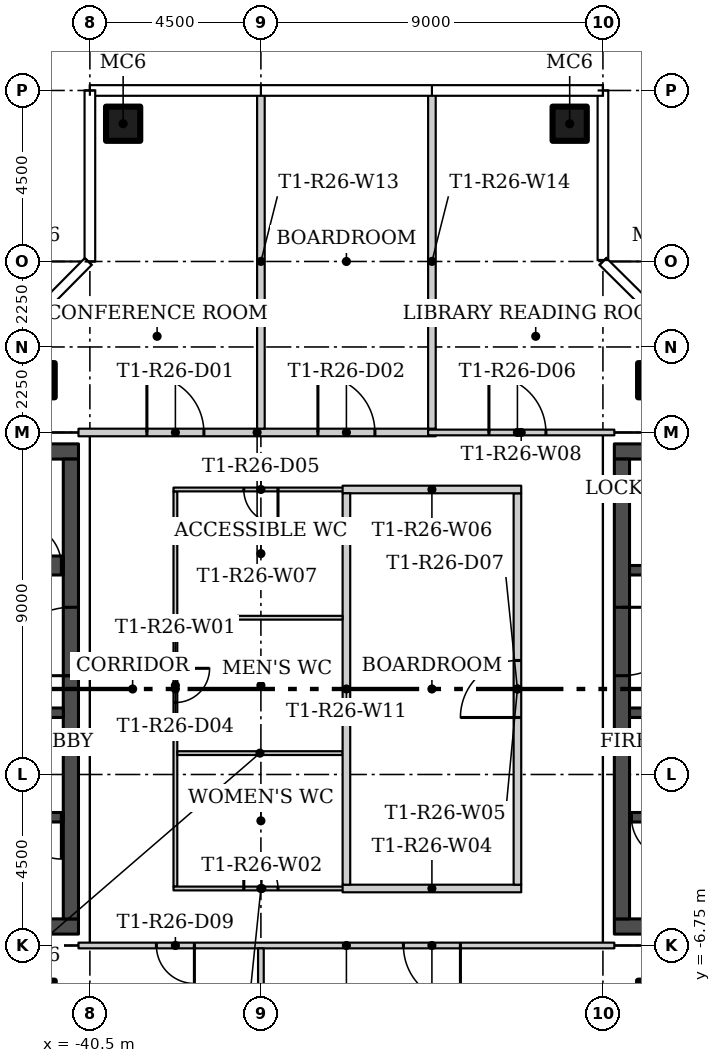
"""IFC4 building model, lengths in metres.
Left out: names, types, materials, properties, quantities, classifications, styles, units other than length and angle.
Written with IfcOpenShell. Run it as: python <this file> out.ifc"""

import sys

from ifc_helpers import new_model, si_unit, direction, frame, frame_2d, origin, origin_2d, place, context, subcontext, project, spatial, rectangle, hollow_rectangle, extrude, element, fill, save


model = new_model("IFC4")
c1 = context("Model", 3, precision=1e-05, world=origin(), true_north=direction((0.0, 1.0)))
c2 = subcontext(c1, "Body", "Model", "MODEL_VIEW")
j1 = project(units=[si_unit("LENGTHUNIT", "METRE"), si_unit("PLANEANGLEUNIT", "RADIAN")], contexts=[c1])
p1 = place(None, origin())
s1 = spatial("IfcSite", under=j1, at=p1, CompositionType="ELEMENT")
p2 = place(p1, origin())
s2 = spatial("IfcBuilding", under=s1, at=p2, CompositionType="ELEMENT")
p3 = place(p2, frame((0.0, 0.0, 242.1)))
s3 = spatial("IfcBuildingStorey", under=s2, at=p3, CompositionType="ELEMENT", Elevation=242.1)
for number, where in (
    (1, (-25.625, 8.125, 0.0)),
    (2, (-25.625, -8.125, 0.0)),
    (3, (-41.875, 8.125, 0.0)),
    (4, (-41.875, -8.125, 0.0)),
    (5, (-39.625, 14.875, 0.0)),
    (6, (-27.875, 14.875, 0.0)),
):
    element("IfcColumn", number, at=place(p3, frame(where)), inside=s3, PredefinedType="COLUMN", context=c2, shape_type="SweptSolid", body=[
        extrude(hollow_rectangle(XDim=0.9, YDim=0.9, WallThickness=0.036, at=origin_2d()), origin(), (0.0, 0.0, 1.0), 3.55),
    ])
p4 = place(p3, frame((-38.25, 5.2, 0.0), z_axis=(0.0, 0.0, 1.0), x_axis=(0.0, -1.0, 0.0)))
e7 = element("IfcWall", 7, at=p4, inside=s3, PredefinedType="PARTITIONING", context=c2, shape_type="SweptSolid", body=[
    extrude(rectangle(XDim=10.4, YDim=0.1, at=frame_2d((5.2, 0.0))), origin(), (0.0, 0.0, 1.0), 3.55),
])
p5 = place(p4, frame((4.656, 0.0, 0.0)))
e8 = element("IfcOpeningElement", 8, at=p5, cuts=e7, PredefinedType="OPENING", context=c2, shape_type="SweptSolid", body=[
    extrude(rectangle(XDim=0.9, YDim=2.1, at=frame_2d((0.45, 1.05))), frame((0.0, 0.06, 0.0), z_axis=(0.0, -1.0, 0.0), x_axis=(1.0, 0.0, 0.0)), (0.0, 0.0, 1.0), 0.12),
])
p6 = place(p3, frame((-38.3, -5.25, 0.0)))
e9 = element("IfcWall", 9, at=p6, inside=s3, PredefinedType="PARTITIONING", context=c2, shape_type="SweptSolid", body=[
    extrude(rectangle(XDim=4.65, YDim=0.1, at=frame_2d((2.325, 0.0))), origin(), (0.0, 0.0, 1.0), 3.55),
])
p7 = place(p6, frame((1.85, 0.0, 0.0)))
e10 = element("IfcOpeningElement", 10, at=p7, cuts=e9, PredefinedType="OPENING", context=c2, shape_type="SweptSolid", body=[
    extrude(rectangle(XDim=0.9, YDim=2.1, at=frame_2d((0.45, 1.05))), frame((0.0, 0.06, 0.0), z_axis=(0.0, -1.0, 0.0), x_axis=(1.0, 0.0, 0.0)), (0.0, 0.0, 1.0), 0.12),
])
p8 = place(p3, frame((-33.65, 5.25, 0.0), z_axis=(0.0, 0.0, 1.0), x_axis=(-1.0, 0.0, 0.0)))
e11 = element("IfcWall", 11, at=p8, inside=s3, PredefinedType="PARTITIONING", context=c2, shape_type="SweptSolid", body=[
    extrude(rectangle(XDim=4.65, YDim=0.1, at=frame_2d((2.325, 0.0))), origin(), (0.0, 0.0, 1.0), 3.55),
])
p9 = place(p8, frame((1.9, 0.0, 0.0)))
e12 = element("IfcOpeningElement", 12, at=p9, cuts=e11, PredefinedType="OPENING", context=c2, shape_type="SweptSolid", body=[
    extrude(rectangle(XDim=0.9, YDim=2.1, at=frame_2d((0.45, 1.05))), frame((0.0, 0.06, 0.0), z_axis=(0.0, -1.0, 0.0), x_axis=(1.0, 0.0, 0.0)), (0.0, 0.0, 1.0), 0.12),
])
p10 = place(p3, frame((-33.85, -5.25, 0.0)))
e13 = element("IfcWall", 13, at=p10, inside=s3, PredefinedType="PARTITIONING", context=c2, shape_type="SweptSolid", body=[
    extrude(rectangle(XDim=4.7, YDim=0.2, at=frame_2d((2.35, 0.0))), origin(), (0.0, 0.0, 1.0), 3.55),
])
p11 = place(p3, frame((-29.25, -5.15, 0.0), z_axis=(0.0, 0.0, 1.0), x_axis=(0.0, 1.0, 0.0)))
e14 = element("IfcWall", 14, at=p11, inside=s3, PredefinedType="PARTITIONING", context=c2, shape_type="SweptSolid", body=[
    extrude(rectangle(XDim=10.3, YDim=0.2, at=frame_2d((5.15, 0.0))), origin(), (0.0, 0.0, 1.0), 3.55),
])
p12 = place(p11, frame((4.4, 0.0, 0.0)))
e15 = element("IfcOpeningElement", 15, at=p12, cuts=e14, PredefinedType="OPENING", context=c2, shape_type="SweptSolid", body=[
    extrude(rectangle(XDim=1.5, YDim=2.4, at=frame_2d((0.75, 1.2))), frame((0.0, 0.11, 0.0), z_axis=(0.0, -1.0, 0.0), x_axis=(1.0, 0.0, 0.0)), (0.0, 0.0, 1.0), 0.22),
])
p13 = place(p3, frame((-29.15, 5.25, 0.0), z_axis=(0.0, 0.0, 1.0), x_axis=(-1.0, 0.0, 0.0)))
e16 = element("IfcWall", 16, at=p13, inside=s3, PredefinedType="PARTITIONING", context=c2, shape_type="SweptSolid", body=[
    extrude(rectangle(XDim=4.7, YDim=0.2, at=frame_2d((2.35, 0.0))), origin(), (0.0, 0.0, 1.0), 3.55),
])
p14 = place(p3, frame((-40.8, 6.75, 0.0)))
e17 = element("IfcWall", 17, at=p14, inside=s3, PredefinedType="PARTITIONING", context=c2, shape_type="SweptSolid", body=[
    extrude(rectangle(XDim=9.4, YDim=0.2, at=frame_2d((4.7, 0.0))), origin(), (0.0, 0.0, 1.0), 3.55),
])
p15 = place(p14, frame((1.8, 0.0, 0.0)))
e18 = element("IfcOpeningElement", 18, at=p15, cuts=e17, PredefinedType="OPENING", context=c2, shape_type="SweptSolid", body=[
    extrude(rectangle(XDim=1.5, YDim=2.4, at=frame_2d((0.75, 1.2))), frame((0.0, 0.11, 0.0), z_axis=(0.0, -1.0, 0.0), x_axis=(1.0, 0.0, 0.0)), (0.0, 0.0, 1.0), 0.22),
])
p16 = place(p14, frame((6.3, 0.0, 0.0)))
e19 = element("IfcOpeningElement", 19, at=p16, cuts=e17, PredefinedType="OPENING", context=c2, shape_type="SweptSolid", body=[
    extrude(rectangle(XDim=1.5, YDim=2.4, at=frame_2d((0.75, 1.2))), frame((0.0, 0.11, 0.0), z_axis=(0.0, -1.0, 0.0), x_axis=(1.0, 0.0, 0.0)), (0.0, 0.0, 1.0), 0.22),
])
p17 = place(p3, frame((-31.6, 6.75, 0.0)))
e20 = element("IfcWall", 20, at=p17, inside=s3, PredefinedType="PARTITIONING", context=c2, shape_type="SweptSolid", body=[
    extrude(rectangle(XDim=4.9, YDim=0.15, at=frame_2d((2.45, 0.0))), origin(), (0.0, 0.0, 1.0), 3.55),
])
p18 = place(p17, frame((1.6, 0.0, 0.0)))
e21 = element("IfcOpeningElement", 21, at=p18, cuts=e20, PredefinedType="OPENING", context=c2, shape_type="SweptSolid", body=[
    extrude(rectangle(XDim=1.5, YDim=2.1, at=frame_2d((0.75, 1.05))), frame((0.0, 0.085, 0.0), z_axis=(0.0, -1.0, 0.0), x_axis=(1.0, 0.0, 0.0)), (0.0, 0.0, 1.0), 0.17),
])
p19 = place(p3, frame((-26.7, -6.75, 0.0), z_axis=(0.0, 0.0, 1.0), x_axis=(-1.0, 0.0, 0.0)))
e22 = element("IfcWall", 22, at=p19, inside=s3, PredefinedType="PARTITIONING", context=c2, shape_type="SweptSolid", body=[
    extrude(rectangle(XDim=14.1, YDim=0.15, at=frame_2d((7.05, 0.0))), origin(), (0.0, 0.0, 1.0), 3.55),
])
p20 = place(p19, frame((4.05, 0.0, 0.0)))
e23 = element("IfcOpeningElement", 23, at=p20, cuts=e22, PredefinedType="OPENING", context=c2, shape_type="SweptSolid", body=[
    extrude(rectangle(XDim=1.5, YDim=2.1, at=frame_2d((0.75, 1.05))), frame((0.0, 0.085, 0.0), z_axis=(0.0, -1.0, 0.0), x_axis=(1.0, 0.0, 0.0)), (0.0, 0.0, 1.0), 0.17),
])
p21 = place(p19, frame((11.05, 0.0, 0.0)))
e24 = element("IfcOpeningElement", 24, at=p21, cuts=e22, PredefinedType="OPENING", context=c2, shape_type="SweptSolid", body=[
    extrude(rectangle(XDim=1.0, YDim=2.4, at=frame_2d((0.5, 1.2))), frame((0.0, 0.085, 0.0), z_axis=(0.0, -1.0, 0.0), x_axis=(1.0, 0.0, 0.0)), (0.0, 0.0, 1.0), 0.17),
])
p22 = place(p3, frame((-33.85, -1.688, 0.0), z_axis=(0.0, 0.0, 1.0), x_axis=(-1.0, 0.0, 0.0)))
e25 = element("IfcWall", 25, at=p22, inside=s3, PredefinedType="PARTITIONING", context=c2, shape_type="SweptSolid", body=[
    extrude(rectangle(XDim=4.35, YDim=0.1, at=frame_2d((2.175, 0.0))), origin(), (0.0, 0.0, 1.0), 3.55),
])
p23 = place(p3, frame((-33.75, -5.15, 0.0), z_axis=(0.0, 0.0, 1.0), x_axis=(0.0, 1.0, 0.0)))
e26 = element("IfcWall", 26, at=p23, inside=s3, PredefinedType="PARTITIONING", context=c2, shape_type="SweptSolid", body=[
    extrude(rectangle(XDim=10.3, YDim=0.2, at=frame_2d((5.15, 0.0))), origin(), (0.0, 0.0, 1.0), 3.55),
])
p24 = place(p3, frame((-33.85, 1.875, 0.0), z_axis=(0.0, 0.0, 1.0), x_axis=(-1.0, 0.0, 0.0)))
e27 = element("IfcWall", 27, at=p24, inside=s3, PredefinedType="PARTITIONING", context=c2, shape_type="SweptSolid", body=[
    extrude(rectangle(XDim=4.35, YDim=0.1, at=frame_2d((2.175, 0.0))), origin(), (0.0, 0.0, 1.0), 3.55),
])
for number, where, z_axis, x_axis in (
    (28, (-36.0, 6.85, 0.0), (0.0, 0.0, 1.0), (0.0, 1.0, 0.0)),
    (29, (-31.5, 6.85, 0.0), (0.0, 0.0, 1.0), (0.0, 1.0, 0.0)),
):
    element("IfcWall", number, at=place(p3, frame(where, z_axis=z_axis, x_axis=x_axis)), inside=s3, PredefinedType="PARTITIONING", context=c2, shape_type="SweptSolid", body=[
        extrude(rectangle(XDim=8.805, YDim=0.2, at=frame_2d((4.402, 0.0))), origin(), (0.0, 0.0, 1.0), 3.55),
    ])
p25 = place(p3, frame((-36.0, -20.155, 0.0), z_axis=(0.0, 0.0, 1.0), x_axis=(0.0, 1.0, 0.0)))
e30 = element("IfcWall", 30, at=p25, inside=s3, PredefinedType="PARTITIONING", context=c2, shape_type="SweptSolid", body=[
    extrude(rectangle(XDim=13.33, YDim=0.15, at=frame_2d((6.665, 0.0))), origin(), (0.0, 0.0, 1.0), 3.55),
])
for number, where in (
    (31, (-26.7, -6.25, 0.0)),
    (32, (-26.7, 6.25, 0.0)),
):
    element("IfcWall", number, at=place(p3, frame(where)), inside=s3, PredefinedType="SHEAR", context=c2, shape_type="SweptSolid", body=[
        extrude(rectangle(XDim=12.9, YDim=0.4, at=frame_2d((6.45, 0.0))), origin(), (0.0, 0.0, 1.0), 3.55),
    ])
p26 = place(p3, frame((-26.5, 6.05, 0.0), z_axis=(0.0, 0.0, 1.0), x_axis=(0.0, -1.0, 0.0)))
e33 = element("IfcWall", 33, at=p26, inside=s3, PredefinedType="SHEAR", context=c2, shape_type="SweptSolid", body=[
    extrude(rectangle(XDim=12.1, YDim=0.4, at=frame_2d((6.05, 0.0))), origin(), (0.0, 0.0, 1.0), 3.55),
])
p27 = place(p26, frame((3.9, 0.0, 0.0)))
e34 = element("IfcOpeningElement", 34, at=p27, cuts=e33, PredefinedType="OPENING", context=c2, shape_type="SweptSolid", body=[
    extrude(rectangle(XDim=1.8, YDim=2.4, at=frame_2d((0.9, 1.2))), frame((0.0, 0.21, 0.0), z_axis=(0.0, -1.0, 0.0), x_axis=(1.0, 0.0, 0.0)), (0.0, 0.0, 1.0), 0.42),
])
p28 = place(p3, frame((-14.2, -3.375, 0.0), z_axis=(0.0, 0.0, 1.0), x_axis=(-1.0, 0.0, 0.0)))
e35 = element("IfcWall", 35, at=p28, inside=s3, PredefinedType="SHEAR", context=c2, shape_type="SweptSolid", body=[
    extrude(rectangle(XDim=12.1, YDim=0.25, at=frame_2d((6.05, 0.0))), origin(), (0.0, 0.0, 1.0), 3.55),
])
p29 = place(p28, frame((10.95, 0.0, 0.0)))
e36 = element("IfcOpeningElement", 36, at=p29, cuts=e35, PredefinedType="OPENING", context=c2, shape_type="SweptSolid", body=[
    extrude(rectangle(XDim=1.1, YDim=2.1, at=frame_2d((0.55, 1.05))), frame((0.0, 0.135, 0.0), z_axis=(0.0, -1.0, 0.0), x_axis=(1.0, 0.0, 0.0)), (0.0, 0.0, 1.0), 0.27),
])
p30 = place(p3, frame((-14.2, -0.625, 0.0), z_axis=(0.0, 0.0, 1.0), x_axis=(-1.0, 0.0, 0.0)))
e37 = element("IfcWall", 37, at=p30, inside=s3, PredefinedType="SHEAR", context=c2, shape_type="SweptSolid", body=[
    extrude(rectangle(XDim=12.1, YDim=0.25, at=frame_2d((6.05, 0.0))), origin(), (0.0, 0.0, 1.0), 3.55),
])
p31 = place(p30, frame((8.65, 0.0, 0.0)))
e38 = element("IfcOpeningElement", 38, at=p31, cuts=e37, PredefinedType="OPENING", context=c2, shape_type="SweptSolid", body=[
    extrude(rectangle(XDim=1.2, YDim=2.1, at=frame_2d((0.6, 1.05))), frame((0.0, 0.135, 0.0), z_axis=(0.0, -1.0, 0.0), x_axis=(1.0, 0.0, 0.0)), (0.0, 0.0, 1.0), 0.27),
])
p32 = place(p30, frame((1.175, 0.0, 0.0)))
e39 = element("IfcOpeningElement", 39, at=p32, cuts=e37, PredefinedType="OPENING", context=c2, shape_type="SweptSolid", body=[
    extrude(rectangle(XDim=0.9, YDim=2.1, at=frame_2d((0.45, 1.05))), frame((0.0, 0.135, 0.0), z_axis=(0.0, -1.0, 0.0), x_axis=(1.0, 0.0, 0.0)), (0.0, 0.0, 1.0), 0.27),
])
p33 = place(p3, frame((-26.3, 3.125, 0.0)))
e40 = element("IfcWall", 40, at=p33, inside=s3, PredefinedType="SHEAR", context=c2, shape_type="SweptSolid", body=[
    extrude(rectangle(XDim=12.1, YDim=0.25, at=frame_2d((6.05, 0.0))), origin(), (0.0, 0.0, 1.0), 3.55),
])
p34 = place(p33, frame((6.95, 0.0, 0.0)))
e41 = element("IfcOpeningElement", 41, at=p34, cuts=e40, PredefinedType="OPENING", context=c2, shape_type="SweptSolid", body=[
    extrude(rectangle(XDim=1.1, YDim=2.1, at=frame_2d((0.55, 1.05))), frame((0.0, 0.135, 0.0), z_axis=(0.0, -1.0, 0.0), x_axis=(1.0, 0.0, 0.0)), (0.0, 0.0, 1.0), 0.27),
])
p35 = place(p33, frame((10.075, 0.0, 0.0)))
e42 = element("IfcOpeningElement", 42, at=p35, cuts=e40, PredefinedType="OPENING", context=c2, shape_type="SweptSolid", body=[
    extrude(rectangle(XDim=1.1, YDim=2.1, at=frame_2d((0.55, 1.05))), frame((0.0, 0.135, 0.0), z_axis=(0.0, -1.0, 0.0), x_axis=(1.0, 0.0, 0.0)), (0.0, 0.0, 1.0), 0.27),
])
p36 = place(p33, frame((0.5, 0.0, 0.0)))
e43 = element("IfcOpeningElement", 43, at=p36, cuts=e40, PredefinedType="OPENING", context=c2, shape_type="SweptSolid", body=[
    extrude(rectangle(XDim=0.9, YDim=2.1, at=frame_2d((0.45, 1.05))), frame((0.0, 0.135, 0.0), z_axis=(0.0, -1.0, 0.0), x_axis=(1.0, 0.0, 0.0)), (0.0, 0.0, 1.0), 0.27),
])
p37 = place(p33, frame((3.425, 0.0, 0.0)))
e44 = element("IfcOpeningElement", 44, at=p37, cuts=e40, PredefinedType="OPENING", context=c2, shape_type="SweptSolid", body=[
    extrude(rectangle(XDim=0.9, YDim=2.1, at=frame_2d((0.45, 1.05))), frame((0.0, 0.135, 0.0), z_axis=(0.0, -1.0, 0.0), x_axis=(1.0, 0.0, 0.0)), (0.0, 0.0, 1.0), 0.27),
])
for number, where, z_axis, x_axis in (
    (45, (-40.8, -6.25, 0.0), (0.0, 0.0, 1.0), (-1.0, 0.0, 0.0)),
    (46, (-40.8, 6.25, 0.0), (0.0, 0.0, 1.0), (-1.0, 0.0, 0.0)),
):
    element("IfcWall", number, at=place(p3, frame(where, z_axis=z_axis, x_axis=x_axis)), inside=s3, PredefinedType="SHEAR", context=c2, shape_type="SweptSolid", body=[
        extrude(rectangle(XDim=12.9, YDim=0.4, at=frame_2d((6.45, 0.0))), origin(), (0.0, 0.0, 1.0), 3.55),
    ])
p38 = place(p3, frame((-41.0, -6.05, 0.0), z_axis=(0.0, 0.0, 1.0), x_axis=(0.0, 1.0, 0.0)))
e47 = element("IfcWall", 47, at=p38, inside=s3, PredefinedType="SHEAR", context=c2, shape_type="SweptSolid", body=[
    extrude(rectangle(XDim=12.1, YDim=0.4, at=frame_2d((6.05, 0.0))), origin(), (0.0, 0.0, 1.0), 3.55),
])
p39 = place(p38, frame((6.4, 0.0, 0.0)))
e48 = element("IfcOpeningElement", 48, at=p39, cuts=e47, PredefinedType="OPENING", context=c2, shape_type="SweptSolid", body=[
    extrude(rectangle(XDim=1.8, YDim=2.4, at=frame_2d((0.9, 1.2))), frame((0.0, 0.21, 0.0), z_axis=(0.0, -1.0, 0.0), x_axis=(1.0, 0.0, 0.0)), (0.0, 0.0, 1.0), 0.42),
])
p40 = place(p3, frame((-41.2, -3.375, 0.0), z_axis=(0.0, 0.0, 1.0), x_axis=(-1.0, 0.0, 0.0)))
e49 = element("IfcWall", 49, at=p40, inside=s3, PredefinedType="SHEAR", context=c2, shape_type="SweptSolid", body=[
    extrude(rectangle(XDim=12.1, YDim=0.25, at=frame_2d((6.05, 0.0))), origin(), (0.0, 0.0, 1.0), 3.55),
])
p41 = place(p40, frame((0.05, 0.0, 0.0)))
e50 = element("IfcOpeningElement", 50, at=p41, cuts=e49, PredefinedType="OPENING", context=c2, shape_type="SweptSolid", body=[
    extrude(rectangle(XDim=1.1, YDim=2.1, at=frame_2d((0.55, 1.05))), frame((0.0, 0.135, 0.0), z_axis=(0.0, -1.0, 0.0), x_axis=(1.0, 0.0, 0.0)), (0.0, 0.0, 1.0), 0.27),
])
p42 = place(p3, frame((-41.2, -0.625, 0.0), z_axis=(0.0, 0.0, 1.0), x_axis=(-1.0, 0.0, 0.0)))
e51 = element("IfcWall", 51, at=p42, inside=s3, PredefinedType="SHEAR", context=c2, shape_type="SweptSolid", body=[
    extrude(rectangle(XDim=12.1, YDim=0.25, at=frame_2d((6.05, 0.0))), origin(), (0.0, 0.0, 1.0), 3.55),
])
p43 = place(p42, frame((2.25, 0.0, 0.0)))
e52 = element("IfcOpeningElement", 52, at=p43, cuts=e51, PredefinedType="OPENING", context=c2, shape_type="SweptSolid", body=[
    extrude(rectangle(XDim=1.2, YDim=2.1, at=frame_2d((0.6, 1.05))), frame((0.0, 0.135, 0.0), z_axis=(0.0, -1.0, 0.0), x_axis=(1.0, 0.0, 0.0)), (0.0, 0.0, 1.0), 0.27),
])
p44 = place(p42, frame((10.025, 0.0, 0.0)))
e53 = element("IfcOpeningElement", 53, at=p44, cuts=e51, PredefinedType="OPENING", context=c2, shape_type="SweptSolid", body=[
    extrude(rectangle(XDim=0.9, YDim=2.1, at=frame_2d((0.45, 1.05))), frame((0.0, 0.135, 0.0), z_axis=(0.0, -1.0, 0.0), x_axis=(1.0, 0.0, 0.0)), (0.0, 0.0, 1.0), 0.27),
])
p45 = place(p3, frame((-48.5, 3.25, 0.0)))
e54 = element("IfcWall", 54, at=p45, inside=s3, PredefinedType="SHEAR", context=c2, shape_type="SweptSolid", body=[
    extrude(rectangle(XDim=7.3, YDim=0.5, at=frame_2d((3.65, 0.0))), origin(), (0.0, 0.0, 1.0), 3.55),
])
p46 = place(p45, frame((6.15, 0.0, 0.0)))
e55 = element("IfcOpeningElement", 55, at=p46, cuts=e54, PredefinedType="OPENING", context=c2, shape_type="SweptSolid", body=[
    extrude(rectangle(XDim=1.1, YDim=2.1, at=frame_2d((0.55, 1.05))), frame((0.0, 0.26, 0.0), z_axis=(0.0, -1.0, 0.0), x_axis=(1.0, 0.0, 0.0)), (0.0, 0.0, 1.0), 0.52),
])
p47 = place(p15, origin())
e56 = element("IfcDoor", 56, at=p47, inside=s3, OperationType="DOUBLE_DOOR_SINGLE_SWING", PredefinedType="DOOR", context=c2, shape_type="SweptSolid", body=[
    extrude(rectangle(XDim=1.5, YDim=2.4, at=frame_2d((0.75, 1.2))), frame((0.0, 0.025, 0.0), z_axis=(0.0, -1.0, 0.0), x_axis=(1.0, 0.0, 0.0)), (0.0, 0.0, 1.0), 0.05),
])
fill(e18, e56)
p48 = place(p16, origin())
e57 = element("IfcDoor", 57, at=p48, inside=s3, OperationType="DOUBLE_DOOR_SINGLE_SWING", PredefinedType="DOOR", context=c2, shape_type="SweptSolid", body=[
    extrude(rectangle(XDim=1.5, YDim=2.4, at=frame_2d((0.75, 1.2))), frame((0.0, 0.025, 0.0), z_axis=(0.0, -1.0, 0.0), x_axis=(1.0, 0.0, 0.0)), (0.0, 0.0, 1.0), 0.05),
])
fill(e19, e57)
p49 = place(p7, origin())
e58 = element("IfcDoor", 58, at=p49, inside=s3, OperationType="SINGLE_SWING_LEFT", PredefinedType="DOOR", context=c2, shape_type="SweptSolid", body=[
    extrude(rectangle(XDim=0.9, YDim=2.1, at=frame_2d((0.45, 1.05))), frame((0.0, 0.025, 0.0), z_axis=(0.0, -1.0, 0.0), x_axis=(1.0, 0.0, 0.0)), (0.0, 0.0, 1.0), 0.05),
])
fill(e10, e58)
p50 = place(p5, origin())
e59 = element("IfcDoor", 59, at=p50, inside=s3, OperationType="SINGLE_SWING_LEFT", PredefinedType="DOOR", context=c2, shape_type="SweptSolid", body=[
    extrude(rectangle(XDim=0.9, YDim=2.1, at=frame_2d((0.45, 1.05))), frame((0.0, 0.025, 0.0), z_axis=(0.0, -1.0, 0.0), x_axis=(1.0, 0.0, 0.0)), (0.0, 0.0, 1.0), 0.05),
])
fill(e8, e59)
p51 = place(p9, origin())
e60 = element("IfcDoor", 60, at=p51, inside=s3, OperationType="SINGLE_SWING_RIGHT", PredefinedType="DOOR", context=c2, shape_type="SweptSolid", body=[
    extrude(rectangle(XDim=0.9, YDim=2.1, at=frame_2d((0.45, 1.05))), frame((0.0, 0.025, 0.0), z_axis=(0.0, -1.0, 0.0), x_axis=(1.0, 0.0, 0.0)), (0.0, 0.0, 1.0), 0.05),
])
fill(e12, e60)
p52 = place(p18, origin())
e61 = element("IfcDoor", 61, at=p52, inside=s3, OperationType="DOUBLE_DOOR_SINGLE_SWING", PredefinedType="DOOR", context=c2, shape_type="SweptSolid", body=[
    extrude(rectangle(XDim=1.5, YDim=2.1, at=frame_2d((0.75, 1.05))), frame((0.0, 0.025, 0.0), z_axis=(0.0, -1.0, 0.0), x_axis=(1.0, 0.0, 0.0)), (0.0, 0.0, 1.0), 0.05),
])
fill(e21, e61)
p53 = place(p12, origin())
e62 = element("IfcDoor", 62, at=p53, inside=s3, OperationType="DOUBLE_DOOR_SINGLE_SWING", PredefinedType="DOOR", context=c2, shape_type="SweptSolid", body=[
    extrude(rectangle(XDim=1.5, YDim=2.4, at=frame_2d((0.75, 1.2))), frame((0.0, 0.025, 0.0), z_axis=(0.0, -1.0, 0.0), x_axis=(1.0, 0.0, 0.0)), (0.0, 0.0, 1.0), 0.05),
])
fill(e15, e62)
p54 = place(p20, origin())
e63 = element("IfcDoor", 63, at=p54, inside=s3, OperationType="DOUBLE_DOOR_SINGLE_SWING", PredefinedType="DOOR", context=c2, shape_type="SweptSolid", body=[
    extrude(rectangle(XDim=1.5, YDim=2.1, at=frame_2d((0.75, 1.05))), frame((0.0, 0.025, 0.0), z_axis=(0.0, -1.0, 0.0), x_axis=(1.0, 0.0, 0.0)), (0.0, 0.0, 1.0), 0.05),
])
fill(e23, e63)
p55 = place(p21, origin())
e64 = element("IfcDoor", 64, at=p55, inside=s3, OperationType="SINGLE_SWING_RIGHT", PredefinedType="DOOR", context=c2, shape_type="SweptSolid", body=[
    extrude(rectangle(XDim=1.0, YDim=2.4, at=frame_2d((0.5, 1.2))), frame((0.0, 0.025, 0.0), z_axis=(0.0, -1.0, 0.0), x_axis=(1.0, 0.0, 0.0)), (0.0, 0.0, 1.0), 0.05),
])
fill(e24, e64)
p56 = place(p27, origin())
e65 = element("IfcDoor", 65, at=p56, inside=s3, OperationType="DOUBLE_DOOR_SINGLE_SWING", PredefinedType="DOOR", context=c2, shape_type="SweptSolid", body=[
    extrude(rectangle(XDim=1.8, YDim=2.4, at=frame_2d((0.9, 1.2))), frame((0.0, 0.025, 0.0), z_axis=(0.0, -1.0, 0.0), x_axis=(1.0, 0.0, 0.0)), (0.0, 0.0, 1.0), 0.05),
])
fill(e34, e65)
p57 = place(p29, origin())
e66 = element("IfcDoor", 66, at=p57, inside=s3, OperationType="SINGLE_SWING_RIGHT", PredefinedType="DOOR", context=c2, shape_type="SweptSolid", body=[
    extrude(rectangle(XDim=1.1, YDim=2.1, at=frame_2d((0.55, 1.05))), frame((0.0, 0.025, 0.0), z_axis=(0.0, -1.0, 0.0), x_axis=(1.0, 0.0, 0.0)), (0.0, 0.0, 1.0), 0.05),
])
fill(e36, e66)
p58 = place(p39, origin())
e67 = element("IfcDoor", 67, at=p58, inside=s3, OperationType="DOUBLE_DOOR_SINGLE_SWING", PredefinedType="DOOR", context=c2, shape_type="SweptSolid", body=[
    extrude(rectangle(XDim=1.8, YDim=2.4, at=frame_2d((0.9, 1.2))), frame((0.0, 0.025, 0.0), z_axis=(0.0, -1.0, 0.0), x_axis=(1.0, 0.0, 0.0)), (0.0, 0.0, 1.0), 0.05),
])
fill(e48, e67)
p59 = place(p41, origin())
e68 = element("IfcDoor", 68, at=p59, inside=s3, OperationType="SINGLE_SWING_LEFT", PredefinedType="DOOR", context=c2, shape_type="SweptSolid", body=[
    extrude(rectangle(XDim=1.1, YDim=2.1, at=frame_2d((0.55, 1.05))), frame((0.0, 0.025, 0.0), z_axis=(0.0, -1.0, 0.0), x_axis=(1.0, 0.0, 0.0)), (0.0, 0.0, 1.0), 0.05),
])
fill(e50, e68)
p60 = place(p46, origin())
e69 = element("IfcDoor", 69, at=p60, inside=s3, OperationType="SINGLE_SWING_RIGHT", PredefinedType="DOOR", context=c2, shape_type="SweptSolid", body=[
    extrude(rectangle(XDim=1.1, YDim=2.1, at=frame_2d((0.55, 1.05))), frame((0.0, 0.025, 0.0), z_axis=(0.0, -1.0, 0.0), x_axis=(1.0, 0.0, 0.0)), (0.0, 0.0, 1.0), 0.05),
])
fill(e55, e69)
save(model, sys.argv[1])
